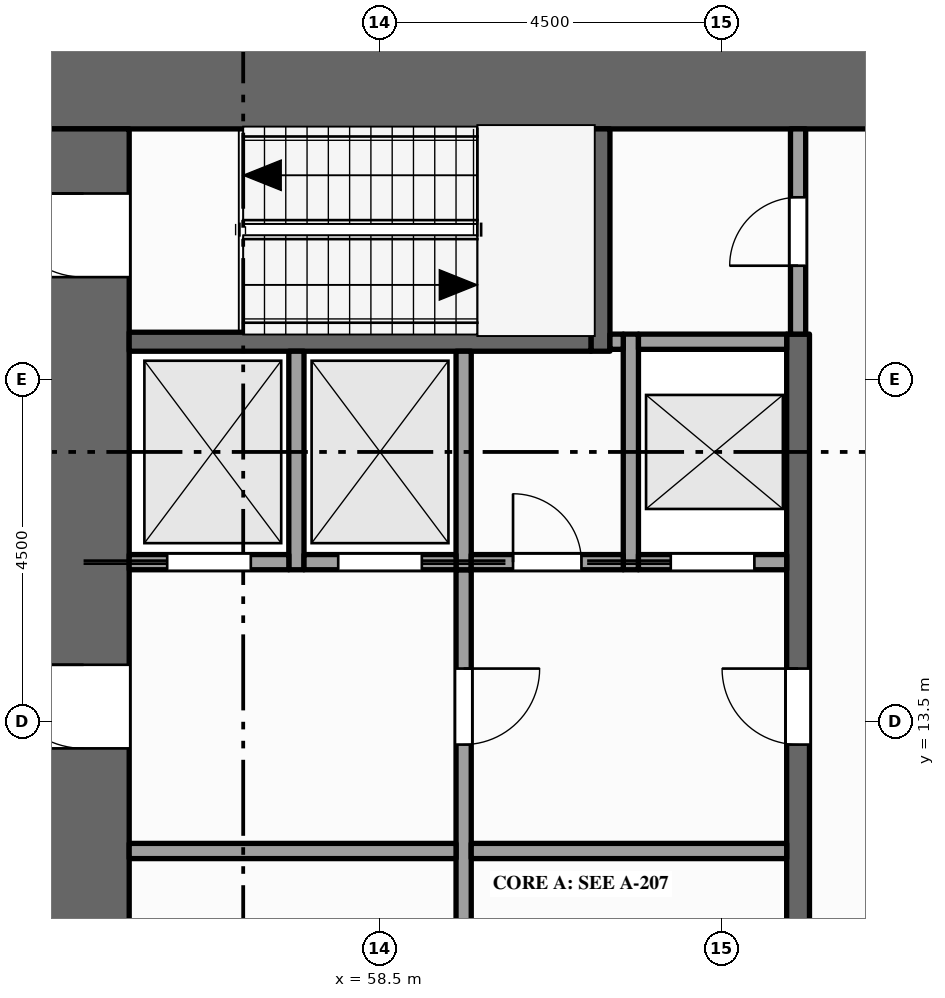
"""IFC4 building model, lengths in metres.
Left out: names, types, materials, properties, quantities, classifications, styles, units other than length and angle.
Written with IfcOpenShell. Run it as: python <this file> out.ifc"""

import sys

from ifc_helpers import new_model, si_unit, direction, frame, frame_2d, origin, place, context, subcontext, project, spatial, rectangle, extrude, element, fill, save


model = new_model("IFC4")
c1 = context("Model", 3, precision=1e-05, world=origin(), true_north=direction((0.0, 1.0)))
c2 = subcontext(c1, "Body", "Model", "MODEL_VIEW")
j1 = project(units=[si_unit("LENGTHUNIT", "METRE"), si_unit("PLANEANGLEUNIT", "RADIAN")], contexts=[c1])
p1 = place(None, origin())
s1 = spatial("IfcSite", under=j1, at=p1, CompositionType="ELEMENT")
p2 = place(p1, origin())
s2 = spatial("IfcBuilding", under=s1, at=p2, CompositionType="ELEMENT")
p3 = place(p2, frame((0.0, 0.0, 33.0)))
s3 = spatial("IfcBuildingStorey", under=s2, at=p3, CompositionType="ELEMENT", Elevation=33.0)
p4 = place(p3, frame((54.0, 21.9, -0.15), z_axis=(0.0, 0.0, 1.0), x_axis=(1.0, 0.0, 0.0)))
e1 = element("IfcWall", 1, at=p4, inside=s3, PredefinedType="SHEAR", context=c2, shape_type="SweptSolid", body=[
    extrude(rectangle(XDim=13.5, YDim=1.2, at=frame_2d((6.75, 0.0))), origin(), (0.0, 0.0, 1.0), 4.0),
])
p5 = place(p3, frame((54.6, 1.2, -0.15), z_axis=(0.0, 0.0, 1.0), x_axis=(0.0, 1.0, 0.0)))
e2 = element("IfcWall", 2, at=p5, inside=s3, PredefinedType="SHEAR", context=c2, shape_type="SweptSolid", body=[
    extrude(rectangle(XDim=20.1, YDim=1.2, at=frame_2d((10.05, 0.0))), origin(), (0.0, 0.0, 1.0), 4.0),
])
p6 = place(p5, frame((5.9, 0.0, 0.15)))
e3 = element("IfcOpeningElement", 3, at=p6, cuts=e2, PredefinedType="OPENING", context=c2, shape_type="SweptSolid", body=[
    extrude(rectangle(XDim=1.8, YDim=2.1, at=frame_2d((0.9, 1.05))), frame((0.0, 0.61, 0.0), z_axis=(0.0, -1.0, 0.0), x_axis=(1.0, 0.0, 0.0)), (0.0, 0.0, 1.0), 1.22),
])
p7 = place(p5, frame((11.95, 0.0, 0.15)))
e4 = element("IfcOpeningElement", 4, at=p7, cuts=e2, PredefinedType="OPENING", context=c2, shape_type="SweptSolid", body=[
    extrude(rectangle(XDim=1.1, YDim=2.1, at=frame_2d((0.55, 1.05))), frame((0.0, 0.61, 0.0), z_axis=(0.0, -1.0, 0.0), x_axis=(1.0, 0.0, 0.0)), (0.0, 0.0, 1.0), 1.22),
])
p8 = place(p5, frame((0.95, 0.0, 0.15)))
e5 = element("IfcOpeningElement", 5, at=p8, cuts=e2, PredefinedType="OPENING", context=c2, shape_type="SweptSolid", body=[
    extrude(rectangle(XDim=1.1, YDim=2.1, at=frame_2d((0.55, 1.05))), frame((0.0, 0.61, 0.0), z_axis=(0.0, -1.0, 0.0), x_axis=(1.0, 0.0, 0.0)), (0.0, 0.0, 1.0), 1.22),
])
p9 = place(p5, frame((18.15, 0.0, 0.15)))
e6 = element("IfcOpeningElement", 6, at=p9, cuts=e2, PredefinedType="OPENING", context=c2, shape_type="SweptSolid", body=[
    extrude(rectangle(XDim=1.1, YDim=2.1, at=frame_2d((0.55, 1.05))), frame((0.0, 0.61, 0.0), z_axis=(0.0, -1.0, 0.0), x_axis=(1.0, 0.0, 0.0)), (0.0, 0.0, 1.0), 1.22),
])
p10 = place(p3, frame((57.4, 15.5, 0.0), z_axis=(0.0, 0.0, 1.0), x_axis=(0.0, 1.0, 0.0)))
e7 = element("IfcWall", 7, at=p10, inside=s3, PredefinedType="SOLIDWALL", context=c2, shape_type="SweptSolid", body=[
    extrude(rectangle(XDim=2.875, YDim=0.2, at=frame_2d((1.438, 0.0))), origin(), (0.0, 0.0, 1.0), 3.85),
])
p11 = place(p3, frame((59.6, 9.3, 0.0), z_axis=(0.0, 0.0, 1.0), x_axis=(0.0, 1.0, 0.0)))
e8 = element("IfcWall", 8, at=p11, inside=s3, PredefinedType="PARTITIONING", context=c2, shape_type="SweptSolid", body=[
    extrude(rectangle(XDim=6.2, YDim=0.2, at=frame_2d((3.1, 0.0))), origin(), (0.0, 0.0, 1.0), 3.85),
])
p12 = place(p11, frame((3.9, 0.0, 0.0)))
e9 = element("IfcOpeningElement", 9, at=p12, cuts=e8, PredefinedType="OPENING", context=c2, shape_type="SweptSolid", body=[
    extrude(rectangle(XDim=1.0, YDim=2.1, at=frame_2d((0.5, 1.05))), frame((0.0, 0.11, 0.0), z_axis=(0.0, -1.0, 0.0), x_axis=(1.0, 0.0, 0.0)), (0.0, 0.0, 1.0), 0.22),
])
p13 = place(p3, frame((59.6, 15.5, 0.0), z_axis=(0.0, 0.0, 1.0), x_axis=(0.0, 1.0, 0.0)))
e10 = element("IfcWall", 10, at=p13, inside=s3, PredefinedType="SOLIDWALL", context=c2, shape_type="SweptSolid", body=[
    extrude(rectangle(XDim=2.875, YDim=0.2, at=frame_2d((1.438, 0.0))), origin(), (0.0, 0.0, 1.0), 3.85),
])
p14 = place(p3, frame((61.4, 18.375, 0.0), z_axis=(0.0, 0.0, 1.0), x_axis=(0.0, 1.0, 0.0)))
e11 = element("IfcWall", 11, at=p14, inside=s3, PredefinedType="SHEAR", context=c2, shape_type="SweptSolid", body=[
    extrude(rectangle(XDim=2.925, YDim=0.25, at=frame_2d((1.462, 0.0))), origin(), (0.0, 0.0, 1.0), 3.85),
])
p15 = place(p3, frame((61.8, 15.5, 0.0), z_axis=(0.0, 0.0, 1.0), x_axis=(0.0, 1.0, 0.0)))
e12 = element("IfcWall", 12, at=p15, inside=s3, PredefinedType="SOLIDWALL", context=c2, shape_type="SweptSolid", body=[
    extrude(rectangle(XDim=3.1, YDim=0.2, at=frame_2d((1.55, 0.0))), origin(), (0.0, 0.0, 1.0), 3.85),
])
p16 = place(p3, frame((64.0, 4.1, 0.0), z_axis=(0.0, 0.0, 1.0), x_axis=(0.0, 1.0, 0.0)))
e13 = element("IfcWall", 13, at=p16, inside=s3, PredefinedType="SHEAR", context=c2, shape_type="SweptSolid", body=[
    extrude(rectangle(XDim=14.5, YDim=0.3, at=frame_2d((7.25, 0.0))), origin(), (0.0, 0.0, 1.0), 3.85),
])
p17 = place(p16, frame((3.4, 0.0, 0.0)))
e14 = element("IfcOpeningElement", 14, at=p17, cuts=e13, PredefinedType="OPENING", context=c2, shape_type="SweptSolid", body=[
    extrude(rectangle(XDim=1.0, YDim=2.1, at=frame_2d((0.5, 1.05))), frame((0.0, 0.16, 0.0), z_axis=(0.0, -1.0, 0.0), x_axis=(1.0, 0.0, 0.0)), (0.0, 0.0, 1.0), 0.32),
])
p18 = place(p16, frame((9.1, 0.0, 0.0)))
e15 = element("IfcOpeningElement", 15, at=p18, cuts=e13, PredefinedType="OPENING", context=c2, shape_type="SweptSolid", body=[
    extrude(rectangle(XDim=1.0, YDim=2.1, at=frame_2d((0.5, 1.05))), frame((0.0, 0.16, 0.0), z_axis=(0.0, -1.0, 0.0), x_axis=(1.0, 0.0, 0.0)), (0.0, 0.0, 1.0), 0.32),
])
p19 = place(p3, frame((64.0, 18.6, 0.0), z_axis=(0.0, 0.0, 1.0), x_axis=(0.0, 1.0, 0.0)))
e16 = element("IfcWall", 16, at=p19, inside=s3, PredefinedType="PARTITIONING", context=c2, shape_type="SweptSolid", body=[
    extrude(rectangle(XDim=2.7, YDim=0.2, at=frame_2d((1.35, 0.0))), origin(), (0.0, 0.0, 1.0), 3.85),
])
p20 = place(p19, frame((0.9, 0.0, 0.0)))
e17 = element("IfcOpeningElement", 17, at=p20, cuts=e16, PredefinedType="OPENING", context=c2, shape_type="SweptSolid", body=[
    extrude(rectangle(XDim=0.9, YDim=2.1, at=frame_2d((0.45, 1.05))), frame((0.0, 0.11, 0.0), z_axis=(0.0, -1.0, 0.0), x_axis=(1.0, 0.0, 0.0)), (0.0, 0.0, 1.0), 0.22),
])
p21 = place(p3, frame((55.2, 11.8, 0.0), z_axis=(0.0, 0.0, 1.0), x_axis=(1.0, 0.0, 0.0)))
e18 = element("IfcWall", 18, at=p21, inside=s3, PredefinedType="PARTITIONING", context=c2, shape_type="SweptSolid", body=[
    extrude(rectangle(XDim=4.3, YDim=0.2, at=frame_2d((2.15, 0.0))), origin(), (0.0, 0.0, 1.0), 3.85),
])
p22 = place(p3, frame((59.7, 11.8, 0.0), z_axis=(0.0, 0.0, 1.0), x_axis=(1.0, 0.0, 0.0)))
e19 = element("IfcWall", 19, at=p22, inside=s3, PredefinedType="PARTITIONING", context=c2, shape_type="SweptSolid", body=[
    extrude(rectangle(XDim=4.15, YDim=0.2, at=frame_2d((2.075, 0.0))), origin(), (0.0, 0.0, 1.0), 3.85),
])
p23 = place(p3, frame((55.2, 15.6, 0.0), z_axis=(0.0, 0.0, 1.0), x_axis=(1.0, 0.0, 0.0)))
e20 = element("IfcWall", 20, at=p23, inside=s3, PredefinedType="SOLIDWALL", context=c2, shape_type="SweptSolid", body=[
    extrude(rectangle(XDim=2.1, YDim=0.2, at=frame_2d((1.05, 0.0))), origin(), (0.0, 0.0, 1.0), 3.85),
])
p24 = place(p23, frame((0.5, 0.0, 0.012)))
e21 = element("IfcOpeningElement", 21, at=p24, cuts=e20, PredefinedType="OPENING", context=c2, shape_type="SweptSolid", body=[
    extrude(rectangle(XDim=1.1, YDim=2.1, at=frame_2d((0.55, 1.05))), frame((0.0, 0.11, 0.0), z_axis=(0.0, -1.0, 0.0), x_axis=(1.0, 0.0, 0.0)), (0.0, 0.0, 1.0), 0.22),
])
p25 = place(p3, frame((57.5, 15.6, 0.0), z_axis=(0.0, 0.0, 1.0), x_axis=(1.0, 0.0, 0.0)))
e22 = element("IfcWall", 22, at=p25, inside=s3, PredefinedType="SOLIDWALL", context=c2, shape_type="SweptSolid", body=[
    extrude(rectangle(XDim=2.0, YDim=0.2, at=frame_2d((1.0, 0.0))), origin(), (0.0, 0.0, 1.0), 3.85),
])
p26 = place(p25, frame((0.45, 0.0, 0.012)))
e23 = element("IfcOpeningElement", 23, at=p26, cuts=e22, PredefinedType="OPENING", context=c2, shape_type="SweptSolid", body=[
    extrude(rectangle(XDim=1.1, YDim=2.1, at=frame_2d((0.55, 1.05))), frame((0.0, 0.11, 0.0), z_axis=(0.0, -1.0, 0.0), x_axis=(1.0, 0.0, 0.0)), (0.0, 0.0, 1.0), 0.22),
])
p27 = place(p3, frame((59.7, 15.6, 0.0), z_axis=(0.0, 0.0, 1.0), x_axis=(1.0, 0.0, 0.0)))
e24 = element("IfcWall", 24, at=p27, inside=s3, PredefinedType="PARTITIONING", context=c2, shape_type="SweptSolid", body=[
    extrude(rectangle(XDim=2.0, YDim=0.2, at=frame_2d((1.0, 0.0))), origin(), (0.0, 0.0, 1.0), 3.85),
])
p28 = place(p27, frame((0.55, 0.0, 0.0)))
e25 = element("IfcOpeningElement", 25, at=p28, cuts=e24, PredefinedType="OPENING", context=c2, shape_type="SweptSolid", body=[
    extrude(rectangle(XDim=0.9, YDim=2.1, at=frame_2d((0.45, 1.05))), frame((0.0, 0.11, 0.0), z_axis=(0.0, -1.0, 0.0), x_axis=(1.0, 0.0, 0.0)), (0.0, 0.0, 1.0), 0.22),
])
p29 = place(p3, frame((61.9, 15.6, 0.0), z_axis=(0.0, 0.0, 1.0), x_axis=(1.0, 0.0, 0.0)))
e26 = element("IfcWall", 26, at=p29, inside=s3, PredefinedType="SOLIDWALL", context=c2, shape_type="SweptSolid", body=[
    extrude(rectangle(XDim=1.95, YDim=0.2, at=frame_2d((0.975, 0.0))), origin(), (0.0, 0.0, 1.0), 3.85),
])
p30 = place(p29, frame((0.425, 0.0, 0.012)))
e27 = element("IfcOpeningElement", 27, at=p30, cuts=e26, PredefinedType="OPENING", context=c2, shape_type="SweptSolid", body=[
    extrude(rectangle(XDim=1.1, YDim=2.1, at=frame_2d((0.55, 1.05))), frame((0.0, 0.11, 0.0), z_axis=(0.0, -1.0, 0.0), x_axis=(1.0, 0.0, 0.0)), (0.0, 0.0, 1.0), 0.22),
])
p31 = place(p3, frame((55.2, 18.5, 0.0), z_axis=(0.0, 0.0, 1.0), x_axis=(1.0, 0.0, 0.0)))
e28 = element("IfcWall", 28, at=p31, inside=s3, PredefinedType="SHEAR", context=c2, shape_type="SweptSolid", body=[
    extrude(rectangle(XDim=6.075, YDim=0.25, at=frame_2d((3.038, 0.0))), origin(), (0.0, 0.0, 1.0), 3.85),
])
p32 = place(p3, frame((61.525, 18.5, 0.0), z_axis=(0.0, 0.0, 1.0), x_axis=(1.0, 0.0, 0.0)))
e29 = element("IfcWall", 29, at=p32, inside=s3, PredefinedType="PARTITIONING", context=c2, shape_type="SweptSolid", body=[
    extrude(rectangle(XDim=0.175, YDim=0.2, at=frame_2d((0.087, 0.0))), origin(), (0.0, 0.0, 1.0), 3.85),
])
p33 = place(p3, frame((61.9, 18.5, 0.0), z_axis=(0.0, 0.0, 1.0), x_axis=(1.0, 0.0, 0.0)))
e30 = element("IfcWall", 30, at=p33, inside=s3, PredefinedType="SOLIDWALL", context=c2, shape_type="SweptSolid", body=[
    extrude(rectangle(XDim=1.95, YDim=0.2, at=frame_2d((0.975, 0.0))), origin(), (0.0, 0.0, 1.0), 3.85),
])
p34 = place(p24, origin())
e31 = element("IfcDoor", 31, at=p34, inside=s3, OperationType="SLIDING_TO_LEFT", PredefinedType="DOOR", context=c2, shape_type="SweptSolid", body=[
    extrude(rectangle(XDim=1.1, YDim=2.1, at=frame_2d((0.55, 1.05))), frame((0.0, 0.025, 0.0), z_axis=(0.0, -1.0, 0.0), x_axis=(1.0, 0.0, 0.0)), (0.0, 0.0, 1.0), 0.05),
])
fill(e21, e31)
p35 = place(p26, origin())
e32 = element("IfcDoor", 32, at=p35, inside=s3, OperationType="SLIDING_TO_RIGHT", PredefinedType="DOOR", context=c2, shape_type="SweptSolid", body=[
    extrude(rectangle(XDim=1.1, YDim=2.1, at=frame_2d((0.55, 1.05))), frame((0.0, 0.025, 0.0), z_axis=(0.0, -1.0, 0.0), x_axis=(1.0, 0.0, 0.0)), (0.0, 0.0, 1.0), 0.05),
])
fill(e23, e32)
p36 = place(p30, origin())
e33 = element("IfcDoor", 33, at=p36, inside=s3, OperationType="SLIDING_TO_LEFT", PredefinedType="DOOR", context=c2, shape_type="SweptSolid", body=[
    extrude(rectangle(XDim=1.1, YDim=2.1, at=frame_2d((0.55, 1.05))), frame((0.0, 0.025, 0.0), z_axis=(0.0, -1.0, 0.0), x_axis=(1.0, 0.0, 0.0)), (0.0, 0.0, 1.0), 0.05),
])
fill(e27, e33)
p37 = place(p7, origin())
e34 = element("IfcDoor", 34, at=p37, inside=s3, OperationType="SINGLE_SWING_RIGHT", PredefinedType="DOOR", context=c2, shape_type="SweptSolid", body=[
    extrude(rectangle(XDim=1.1, YDim=2.1, at=frame_2d((0.55, 1.05))), frame((0.0, 0.025, 0.0), z_axis=(0.0, -1.0, 0.0), x_axis=(1.0, 0.0, 0.0)), (0.0, 0.0, 1.0), 0.05),
])
fill(e4, e34)
p38 = place(p12, origin())
e35 = element("IfcDoor", 35, at=p38, inside=s3, OperationType="SINGLE_SWING_RIGHT", PredefinedType="DOOR", context=c2, shape_type="SweptSolid", body=[
    extrude(rectangle(XDim=1.0, YDim=2.1, at=frame_2d((0.5, 1.05))), frame((0.0, 0.025, 0.0), z_axis=(0.0, -1.0, 0.0), x_axis=(1.0, 0.0, 0.0)), (0.0, 0.0, 1.0), 0.05),
])
fill(e9, e35)
p39 = place(p18, origin())
e36 = element("IfcDoor", 36, at=p39, inside=s3, OperationType="SINGLE_SWING_RIGHT", PredefinedType="DOOR", context=c2, shape_type="SweptSolid", body=[
    extrude(rectangle(XDim=1.0, YDim=2.1, at=frame_2d((0.5, 1.05))), frame((0.0, 0.025, 0.0), z_axis=(0.0, -1.0, 0.0), x_axis=(1.0, 0.0, 0.0)), (0.0, 0.0, 1.0), 0.05),
])
fill(e15, e36)
p40 = place(p9, origin())
e37 = element("IfcDoor", 37, at=p40, inside=s3, OperationType="SINGLE_SWING_RIGHT", PredefinedType="DOOR", context=c2, shape_type="SweptSolid", body=[
    extrude(rectangle(XDim=1.1, YDim=2.1, at=frame_2d((0.55, 1.05))), frame((0.0, 0.025, 0.0), z_axis=(0.0, -1.0, 0.0), x_axis=(1.0, 0.0, 0.0)), (0.0, 0.0, 1.0), 0.05),
])
fill(e6, e37)
p41 = place(p20, origin())
e38 = element("IfcDoor", 38, at=p41, inside=s3, OperationType="SINGLE_SWING_LEFT", PredefinedType="DOOR", context=c2, shape_type="SweptSolid", body=[
    extrude(rectangle(XDim=0.9, YDim=2.1, at=frame_2d((0.45, 1.05))), frame((0.0, 0.025, 0.0), z_axis=(0.0, -1.0, 0.0), x_axis=(1.0, 0.0, 0.0)), (0.0, 0.0, 1.0), 0.05),
])
fill(e17, e38)
p42 = place(p28, origin())
e39 = element("IfcDoor", 39, at=p42, inside=s3, OperationType="SINGLE_SWING_LEFT", PredefinedType="DOOR", context=c2, shape_type="SweptSolid", body=[
    extrude(rectangle(XDim=0.9, YDim=2.1, at=frame_2d((0.45, 1.05))), frame((0.0, 0.025, 0.0), z_axis=(0.0, -1.0, 0.0), x_axis=(1.0, 0.0, 0.0)), (0.0, 0.0, 1.0), 0.05),
])
fill(e25, e39)
save(model, sys.argv[1])
